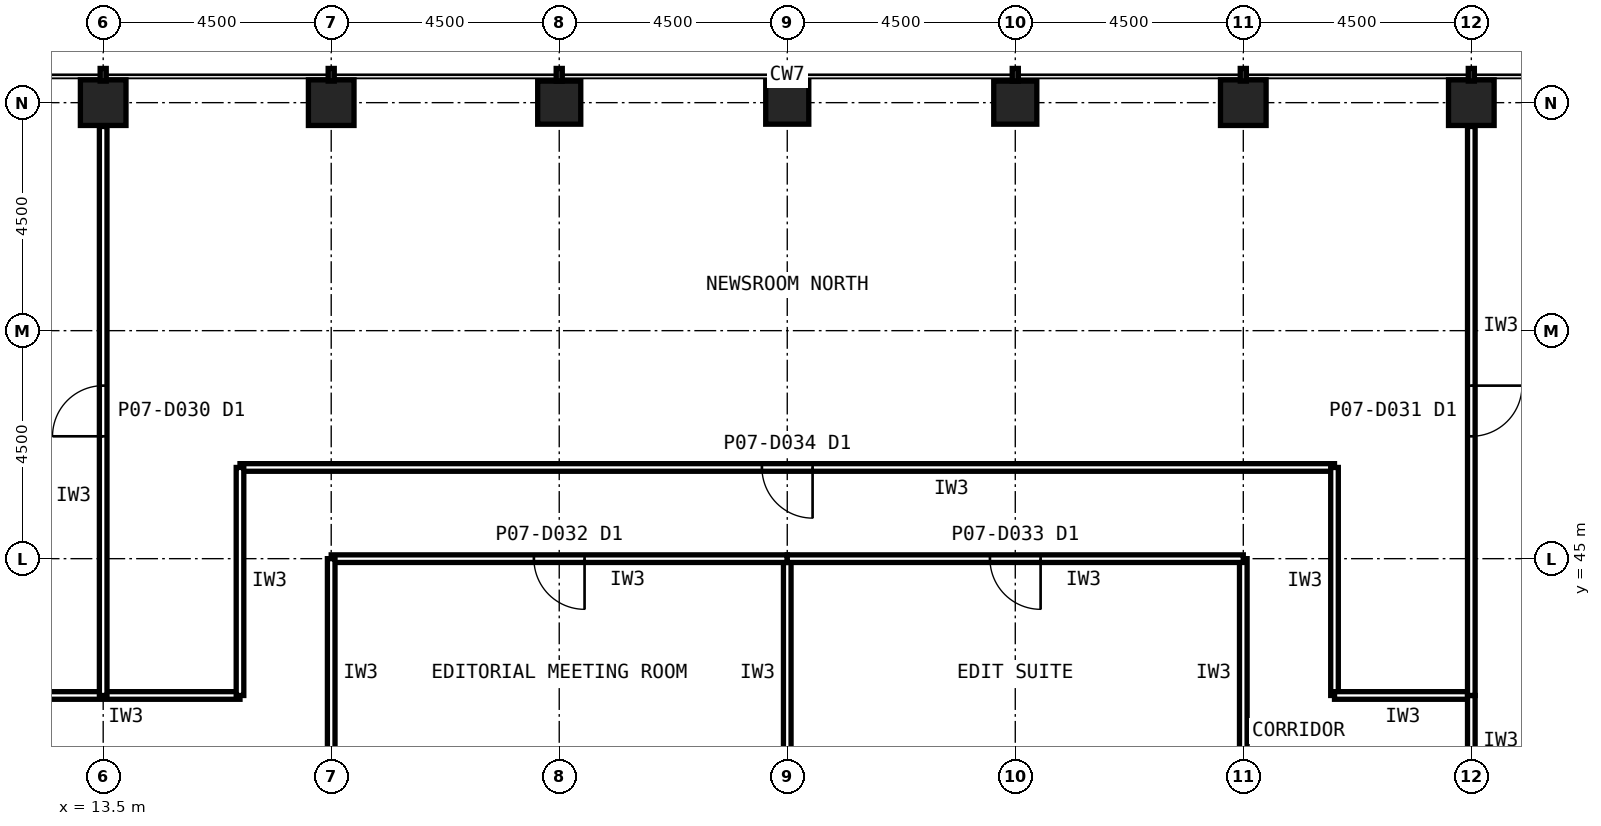
"""IFC4 building model, lengths in metres.
Left out: names, types, materials, properties, quantities, classifications, styles, units other than length and angle.
Written with IfcOpenShell. Run it as: python <this file> out.ifc"""

import sys

from ifc_helpers import new_model, si_unit, direction, frame, frame_2d, origin, origin_2d, place, context, subcontext, project, spatial, rectangle, hollow_rectangle, extrude, element, fill, save


model = new_model("IFC4")
c1 = context("Model", 3, precision=1e-05, world=origin(), true_north=direction((0.0, 1.0)))
c2 = subcontext(c1, "Body", "Model", "MODEL_VIEW")
j1 = project(units=[si_unit("LENGTHUNIT", "METRE"), si_unit("PLANEANGLEUNIT", "RADIAN")], contexts=[c1])
p1 = place(None, origin())
s1 = spatial("IfcSite", under=j1, at=p1, CompositionType="ELEMENT")
p2 = place(p1, origin())
s2 = spatial("IfcBuilding", under=s1, at=p2, CompositionType="ELEMENT")
p3 = place(p2, frame((0.0, 0.0, 33.2)))
s3 = spatial("IfcBuildingStorey", under=s2, at=p3, CompositionType="ELEMENT", Elevation=33.2)
for number, where, z_axis, x_axis in (
    (1, (40.5, 54.0, 0.0), (0.0, 0.0, 1.0), (1.0, 0.0, 0.0)),
    (2, (36.0, 54.0, 0.0), (0.0, 0.0, 1.0), (1.0, 0.0, 0.0)),
):
    element("IfcColumn", number, at=place(p3, frame(where, z_axis=z_axis, x_axis=x_axis)), inside=s3, PredefinedType="COLUMN", context=c2, shape_type="SweptSolid", body=[
        extrude(hollow_rectangle(XDim=0.9, YDim=0.9, WallThickness=0.063, at=origin_2d()), origin(), (0.0, 0.0, 1.0), 4.2),
    ])
for number, where, z_axis, x_axis in (
    (3, (31.5, 54.0, 0.0), (0.0, 0.0, 1.0), (1.0, 0.0, 0.0)),
    (4, (27.0, 54.0, 0.0), (0.0, 0.0, 1.0), (1.0, 0.0, 0.0)),
    (5, (22.5, 54.0, 0.0), (0.0, 0.0, 1.0), (1.0, 0.0, 0.0)),
):
    element("IfcColumn", number, at=place(p3, frame(where, z_axis=z_axis, x_axis=x_axis)), inside=s3, PredefinedType="COLUMN", context=c2, shape_type="SweptSolid", body=[
        extrude(hollow_rectangle(XDim=0.85, YDim=0.85, WallThickness=0.05, at=origin_2d()), origin(), (0.0, 0.0, 1.0), 4.2),
    ])
for number, where, z_axis, x_axis in (
    (6, (18.0, 54.0, 0.0), (0.0, 0.0, 1.0), (1.0, 0.0, 0.0)),
    (7, (13.5, 54.0, 0.0), (0.0, 0.0, 1.0), (1.0, 0.0, 0.0)),
):
    element("IfcColumn", number, at=place(p3, frame(where, z_axis=z_axis, x_axis=x_axis)), inside=s3, PredefinedType="COLUMN", context=c2, shape_type="SweptSolid", body=[
        extrude(hollow_rectangle(XDim=0.9, YDim=0.9, WallThickness=0.063, at=origin_2d()), origin(), (0.0, 0.0, 1.0), 4.2),
    ])
p4 = place(p3, frame((37.8, 46.8, 0.0), z_axis=(0.0, 0.0, 1.0), x_axis=(-1.0, 0.0, 0.0)))
e8 = element("IfcWall", 8, at=p4, inside=s3, PredefinedType="PARTITIONING", context=c2, shape_type="SweptSolid", body=[
    extrude(rectangle(XDim=21.6, YDim=0.15, at=frame_2d((10.8, 0.0))), origin(), (0.0, 0.0, 1.0), 4.04),
])
p5 = place(p4, frame((10.3, 0.0, 0.0)))
e9 = element("IfcOpeningElement", 9, at=p5, cuts=e8, PredefinedType="OPENING", context=c2, shape_type="SweptSolid", body=[
    extrude(rectangle(XDim=1.0, YDim=2.1, at=frame_2d((0.5, 1.05))), frame((0.0, 0.085, 0.0), z_axis=(0.0, -1.0, 0.0), x_axis=(1.0, 0.0, 0.0)), (0.0, 0.0, 1.0), 0.17),
])
for number, where, z_axis, x_axis in (
    (10, (16.2, 42.3, 0.0), (0.0, 0.0, 1.0), (-1.0, 0.0, 0.0)),
    (11, (16.2, 46.8, 0.0), (0.0, 0.0, 1.0), (0.0, -1.0, 0.0)),
    (12, (37.8, 42.3, 0.0), (0.0, 0.0, 1.0), (0.0, 1.0, 0.0)),
):
    element("IfcWall", number, at=place(p3, frame(where, z_axis=z_axis, x_axis=x_axis)), inside=s3, PredefinedType="PARTITIONING", context=c2, shape_type="SweptSolid", body=[
        extrude(rectangle(XDim=4.5, YDim=0.15, at=frame_2d((2.25, 0.0))), origin(), (0.0, 0.0, 1.0), 4.04),
    ])
p6 = place(p3, frame((40.5, 42.3, 0.0), z_axis=(0.0, 0.0, 1.0), x_axis=(-1.0, 0.0, 0.0)))
e13 = element("IfcWall", 13, at=p6, inside=s3, PredefinedType="PARTITIONING", context=c2, shape_type="SweptSolid", body=[
    extrude(rectangle(XDim=2.7, YDim=0.15, at=frame_2d((1.35, 0.0))), origin(), (0.0, 0.0, 1.0), 4.04),
])
p7 = place(p3, frame((40.5, 40.49, 0.0), z_axis=(0.0, 0.0, 1.0), x_axis=(0.0, 1.0, 0.0)))
e14 = element("IfcWall", 14, at=p7, inside=s3, PredefinedType="PARTITIONING", context=c2, shape_type="SweptSolid", body=[
    extrude(rectangle(XDim=1.81, YDim=0.15, at=frame_2d((0.905, 0.0))), origin(), (0.0, 0.0, 1.0), 3.189),
])
p8 = place(p3, frame((27.0, 40.5, 0.0), z_axis=(0.0, 0.0, 1.0), x_axis=(0.0, 1.0, 0.0)))
e15 = element("IfcWall", 15, at=p8, inside=s3, PredefinedType="PARTITIONING", context=c2, shape_type="SweptSolid", body=[
    extrude(rectangle(XDim=4.5, YDim=0.15, at=frame_2d((2.25, 0.0))), origin(), (0.0, 0.0, 1.0), 3.189),
])
p9 = place(p3, frame((27.0, 45.0, 0.0), z_axis=(0.0, 0.0, 1.0), x_axis=(-1.0, 0.0, 0.0)))
e16 = element("IfcWall", 16, at=p9, inside=s3, PredefinedType="PARTITIONING", context=c2, shape_type="SweptSolid", body=[
    extrude(rectangle(XDim=9.0, YDim=0.15, at=frame_2d((4.5, 0.0))), origin(), (0.0, 0.0, 1.0), 4.04),
])
p10 = place(p9, frame((4.0, 0.0, 0.0)))
e17 = element("IfcOpeningElement", 17, at=p10, cuts=e16, PredefinedType="OPENING", context=c2, shape_type="SweptSolid", body=[
    extrude(rectangle(XDim=1.0, YDim=2.1, at=frame_2d((0.5, 1.05))), frame((0.0, 0.085, 0.0), z_axis=(0.0, -1.0, 0.0), x_axis=(1.0, 0.0, 0.0)), (0.0, 0.0, 1.0), 0.17),
])
for number, where, z_axis, x_axis in (
    (18, (18.0, 45.0, 0.0), (0.0, 0.0, 1.0), (0.0, -1.0, 0.0)),
    (19, (36.0, 40.5, 0.0), (0.0, 0.0, 1.0), (0.0, 1.0, 0.0)),
):
    element("IfcWall", number, at=place(p3, frame(where, z_axis=z_axis, x_axis=x_axis)), inside=s3, PredefinedType="PARTITIONING", context=c2, shape_type="SweptSolid", body=[
        extrude(rectangle(XDim=4.5, YDim=0.15, at=frame_2d((2.25, 0.0))), origin(), (0.0, 0.0, 1.0), 3.189),
    ])
p11 = place(p3, frame((36.0, 45.0, 0.0), z_axis=(0.0, 0.0, 1.0), x_axis=(-1.0, 0.0, 0.0)))
e20 = element("IfcWall", 20, at=p11, inside=s3, PredefinedType="PARTITIONING", context=c2, shape_type="SweptSolid", body=[
    extrude(rectangle(XDim=9.0, YDim=0.15, at=frame_2d((4.5, 0.0))), origin(), (0.0, 0.0, 1.0), 4.04),
])
p12 = place(p11, frame((4.0, 0.0, 0.0)))
e21 = element("IfcOpeningElement", 21, at=p12, cuts=e20, PredefinedType="OPENING", context=c2, shape_type="SweptSolid", body=[
    extrude(rectangle(XDim=1.0, YDim=2.1, at=frame_2d((0.5, 1.05))), frame((0.0, 0.085, 0.0), z_axis=(0.0, -1.0, 0.0), x_axis=(1.0, 0.0, 0.0)), (0.0, 0.0, 1.0), 0.17),
])
p13 = place(p3, frame((40.5, 53.53, 0.0), z_axis=(0.0, 0.0, 1.0), x_axis=(0.0, -1.0, 0.0)))
e22 = element("IfcWall", 22, at=p13, inside=s3, PredefinedType="PARTITIONING", context=c2, shape_type="SweptSolid", body=[
    extrude(rectangle(XDim=11.23, YDim=0.15, at=frame_2d((5.615, 0.0))), origin(), (0.0, 0.0, 1.0), 3.189),
])
p14 = place(p13, frame((5.115, 0.0, 0.0)))
e23 = element("IfcOpeningElement", 23, at=p14, cuts=e22, PredefinedType="OPENING", context=c2, shape_type="SweptSolid", body=[
    extrude(rectangle(XDim=1.0, YDim=2.1, at=frame_2d((0.5, 1.05))), frame((0.0, 0.085, 0.0), z_axis=(0.0, -1.0, 0.0), x_axis=(1.0, 0.0, 0.0)), (0.0, 0.0, 1.0), 0.17),
])
p15 = place(p3, frame((13.5, 42.3, 0.0), z_axis=(0.0, 0.0, 1.0), x_axis=(0.0, 1.0, 0.0)))
e24 = element("IfcWall", 24, at=p15, inside=s3, PredefinedType="PARTITIONING", context=c2, shape_type="SweptSolid", body=[
    extrude(rectangle(XDim=11.23, YDim=0.15, at=frame_2d((5.615, 0.0))), origin(), (0.0, 0.0, 1.0), 3.189),
])
p16 = place(p15, frame((5.115, 0.0, 0.0)))
e25 = element("IfcOpeningElement", 25, at=p16, cuts=e24, PredefinedType="OPENING", context=c2, shape_type="SweptSolid", body=[
    extrude(rectangle(XDim=1.0, YDim=2.1, at=frame_2d((0.5, 1.05))), frame((0.0, 0.085, 0.0), z_axis=(0.0, -1.0, 0.0), x_axis=(1.0, 0.0, 0.0)), (0.0, 0.0, 1.0), 0.17),
])
p17 = place(p5, origin())
e26 = element("IfcDoor", 26, at=p17, inside=s3, OperationType="SINGLE_SWING_LEFT", PredefinedType="DOOR", context=c2, shape_type="SweptSolid", body=[
    extrude(rectangle(XDim=1.0, YDim=2.1, at=frame_2d((0.5, 1.05))), frame((0.0, 0.025, 0.0), z_axis=(0.0, -1.0, 0.0), x_axis=(1.0, 0.0, 0.0)), (0.0, 0.0, 1.0), 0.05),
])
fill(e9, e26)
p18 = place(p10, origin())
e27 = element("IfcDoor", 27, at=p18, inside=s3, OperationType="SINGLE_SWING_LEFT", PredefinedType="DOOR", context=c2, shape_type="SweptSolid", body=[
    extrude(rectangle(XDim=1.0, YDim=2.1, at=frame_2d((0.5, 1.05))), frame((0.0, 0.025, 0.0), z_axis=(0.0, -1.0, 0.0), x_axis=(1.0, 0.0, 0.0)), (0.0, 0.0, 1.0), 0.05),
])
fill(e17, e27)
p19 = place(p12, origin())
e28 = element("IfcDoor", 28, at=p19, inside=s3, OperationType="SINGLE_SWING_LEFT", PredefinedType="DOOR", context=c2, shape_type="SweptSolid", body=[
    extrude(rectangle(XDim=1.0, YDim=2.1, at=frame_2d((0.5, 1.05))), frame((0.0, 0.025, 0.0), z_axis=(0.0, -1.0, 0.0), x_axis=(1.0, 0.0, 0.0)), (0.0, 0.0, 1.0), 0.05),
])
fill(e21, e28)
p20 = place(p14, origin())
e29 = element("IfcDoor", 29, at=p20, inside=s3, OperationType="SINGLE_SWING_LEFT", PredefinedType="DOOR", context=c2, shape_type="SweptSolid", body=[
    extrude(rectangle(XDim=1.0, YDim=2.1, at=frame_2d((0.5, 1.05))), frame((0.0, 0.025, 0.0), z_axis=(0.0, -1.0, 0.0), x_axis=(1.0, 0.0, 0.0)), (0.0, 0.0, 1.0), 0.05),
])
fill(e23, e29)
p21 = place(p16, origin())
e30 = element("IfcDoor", 30, at=p21, inside=s3, OperationType="SINGLE_SWING_LEFT", PredefinedType="DOOR", context=c2, shape_type="SweptSolid", body=[
    extrude(rectangle(XDim=1.0, YDim=2.1, at=frame_2d((0.5, 1.05))), frame((0.0, 0.025, 0.0), z_axis=(0.0, -1.0, 0.0), x_axis=(1.0, 0.0, 0.0)), (0.0, 0.0, 1.0), 0.05),
])
fill(e25, e30)
save(model, sys.argv[1])
